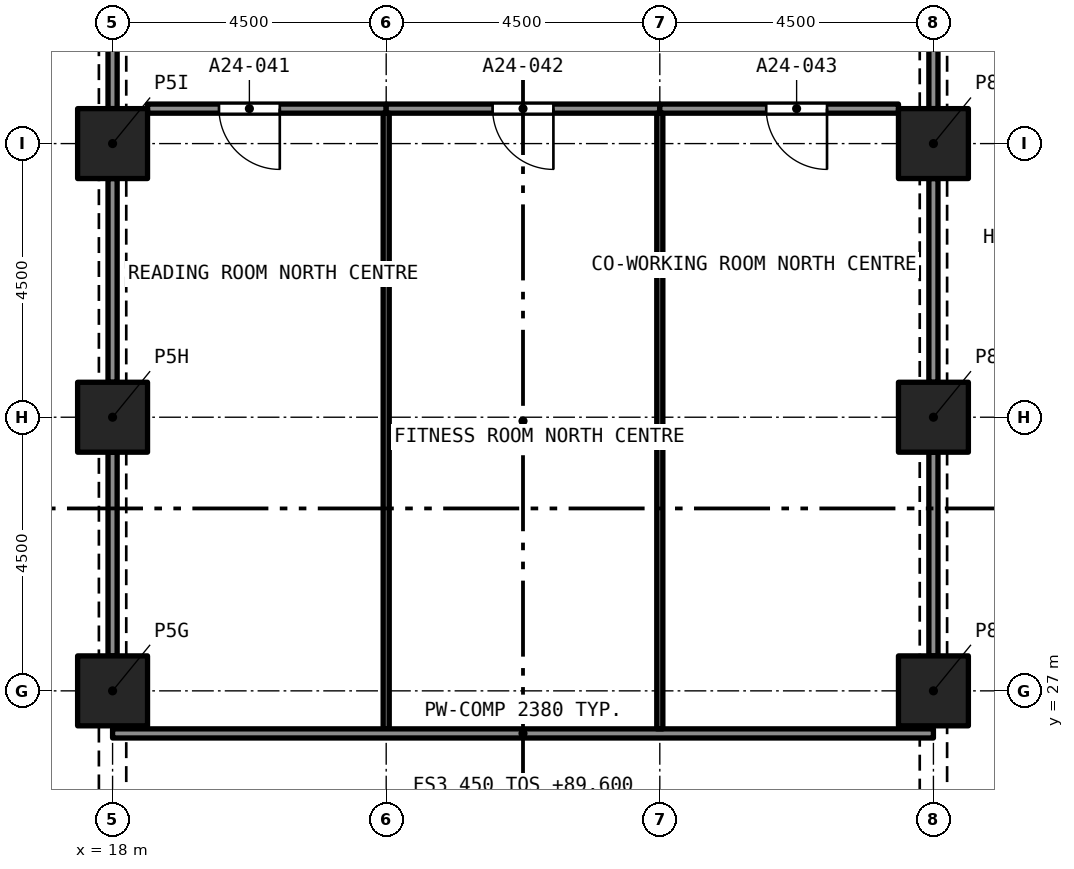
"""IFC4 building model, lengths in metres.
Left out: names, types, materials, properties, quantities, classifications, styles, units other than length and angle.
Written with IfcOpenShell. Run it as: python <this file> out.ifc"""

import sys

from ifc_helpers import new_model, si_unit, direction, frame, frame_2d, origin, origin_2d, place, context, subcontext, project, spatial, rectangle, extrude, element, fill, save


model = new_model("IFC4")
c1 = context("Model", 3, precision=1e-05, world=origin(), true_north=direction((0.0, 1.0)))
c2 = subcontext(c1, "Body", "Model", "MODEL_VIEW")
j1 = project(units=[si_unit("LENGTHUNIT", "METRE"), si_unit("PLANEANGLEUNIT", "RADIAN")], contexts=[c1])
p1 = place(None, origin())
s1 = spatial("IfcSite", under=j1, at=p1, CompositionType="ELEMENT")
p2 = place(p1, origin())
s2 = spatial("IfcBuilding", under=s1, at=p2, CompositionType="ELEMENT")
p3 = place(p2, frame((0.0, 0.0, 89.6)))
s3 = spatial("IfcBuildingStorey", under=s2, at=p3, CompositionType="ELEMENT", Elevation=89.6)
for number, where, z_axis, x_axis in (
    (1, (18.0, 27.0, 0.0), (0.0, 0.0, 1.0), (1.0, 0.0, 0.0)),
    (2, (31.5, 27.0, 0.0), (0.0, 0.0, 1.0), (1.0, 0.0, 0.0)),
    (3, (18.0, 31.5, 0.0), (0.0, 0.0, 1.0), (1.0, 0.0, 0.0)),
    (4, (31.5, 31.5, 0.0), (0.0, 0.0, 1.0), (1.0, 0.0, 0.0)),
    (5, (18.0, 36.0, 0.0), (0.0, 0.0, 1.0), (1.0, 0.0, 0.0)),
    (6, (31.5, 36.0, 0.0), (0.0, 0.0, 1.0), (1.0, 0.0, 0.0)),
):
    element("IfcColumn", number, at=place(p3, frame(where, z_axis=z_axis, x_axis=x_axis)), inside=s3, PredefinedType="COLUMN", context=c2, shape_type="SweptSolid", body=[
        extrude(rectangle(XDim=1.15, YDim=1.15, at=origin_2d()), origin(), (0.0, 0.0, 1.0), 3.2),
    ])
p4 = place(p3, frame((22.5, 36.575, 0.0), z_axis=(0.0, 0.0, 1.0), x_axis=(-1.0, 0.0, 0.0)))
e7 = element("IfcWall", 7, at=p4, inside=s3, PredefinedType="PARTITIONING", context=c2, shape_type="SweptSolid", body=[
    extrude(rectangle(XDim=3.925, YDim=0.15, at=frame_2d((1.962, 0.0))), origin(), (0.0, 0.0, 1.0), 2.75),
])
p5 = place(p4, frame((1.75, 0.0, 0.0)))
e8 = element("IfcOpeningElement", 8, at=p5, cuts=e7, PredefinedType="OPENING", context=c2, shape_type="SweptSolid", body=[
    extrude(rectangle(XDim=1.0, YDim=2.1, at=frame_2d((0.5, 1.05))), frame((0.0, 0.085, 0.0), z_axis=(0.0, -1.0, 0.0), x_axis=(1.0, 0.0, 0.0)), (0.0, 0.0, 1.0), 0.17),
])
p6 = place(p3, frame((27.0, 36.575, 0.0), z_axis=(0.0, 0.0, 1.0), x_axis=(-1.0, 0.0, 0.0)))
e9 = element("IfcWall", 9, at=p6, inside=s3, PredefinedType="PARTITIONING", context=c2, shape_type="SweptSolid", body=[
    extrude(rectangle(XDim=4.5, YDim=0.15, at=frame_2d((2.25, 0.0))), origin(), (0.0, 0.0, 1.0), 2.75),
])
p7 = place(p6, frame((1.75, 0.0, 0.0)))
e10 = element("IfcOpeningElement", 10, at=p7, cuts=e9, PredefinedType="OPENING", context=c2, shape_type="SweptSolid", body=[
    extrude(rectangle(XDim=1.0, YDim=2.1, at=frame_2d((0.5, 1.05))), frame((0.0, 0.085, 0.0), z_axis=(0.0, -1.0, 0.0), x_axis=(1.0, 0.0, 0.0)), (0.0, 0.0, 1.0), 0.17),
])
p8 = place(p3, frame((30.925, 36.575, 0.0), z_axis=(0.0, 0.0, 1.0), x_axis=(-1.0, 0.0, 0.0)))
e11 = element("IfcWall", 11, at=p8, inside=s3, PredefinedType="PARTITIONING", context=c2, shape_type="SweptSolid", body=[
    extrude(rectangle(XDim=3.925, YDim=0.15, at=frame_2d((1.962, 0.0))), origin(), (0.0, 0.0, 1.0), 2.75),
])
p9 = place(p8, frame((1.175, 0.0, 0.0)))
e12 = element("IfcOpeningElement", 12, at=p9, cuts=e11, PredefinedType="OPENING", context=c2, shape_type="SweptSolid", body=[
    extrude(rectangle(XDim=1.0, YDim=2.1, at=frame_2d((0.5, 1.05))), frame((0.0, 0.085, 0.0), z_axis=(0.0, -1.0, 0.0), x_axis=(1.0, 0.0, 0.0)), (0.0, 0.0, 1.0), 0.17),
])
p10 = place(p3, frame((31.5, 36.575, 0.0), z_axis=(0.0, 0.0, 1.0), x_axis=(0.0, 1.0, 0.0)))
e13 = element("IfcWall", 13, at=p10, inside=s3, PredefinedType="PARTITIONING", context=c2, shape_type="SweptSolid", body=[
    extrude(rectangle(XDim=3.35, YDim=0.15, at=frame_2d((1.675, 0.0))), origin(), (0.0, 0.0, 1.0), 2.38),
])
p11 = place(p10, frame((1.075, 0.0, 0.0)))
e14 = element("IfcOpeningElement", 14, at=p11, cuts=e13, PredefinedType="OPENING", context=c2, shape_type="SweptSolid", body=[
    extrude(rectangle(XDim=1.2, YDim=2.1, at=frame_2d((0.6, 1.05))), frame((0.0, 0.085, 0.0), z_axis=(0.0, -1.0, 0.0), x_axis=(1.0, 0.0, 0.0)), (0.0, 0.0, 1.0), 0.17),
])
p12 = place(p3, frame((18.0, 39.925, 0.0), z_axis=(0.0, 0.0, 1.0), x_axis=(0.0, -1.0, 0.0)))
e15 = element("IfcWall", 15, at=p12, inside=s3, PredefinedType="PARTITIONING", context=c2, shape_type="SweptSolid", body=[
    extrude(rectangle(XDim=3.35, YDim=0.15, at=frame_2d((1.675, 0.0))), origin(), (0.0, 0.0, 1.0), 2.38),
])
p13 = place(p12, frame((1.075, 0.0, 0.0)))
e16 = element("IfcOpeningElement", 16, at=p13, cuts=e15, PredefinedType="OPENING", context=c2, shape_type="SweptSolid", body=[
    extrude(rectangle(XDim=1.2, YDim=2.1, at=frame_2d((0.6, 1.05))), frame((0.0, 0.085, 0.0), z_axis=(0.0, -1.0, 0.0), x_axis=(1.0, 0.0, 0.0)), (0.0, 0.0, 1.0), 0.17),
])
p14 = place(p3, frame((22.5, 26.375, 0.0), z_axis=(0.0, 0.0, 1.0), x_axis=(0.0, 1.0, 0.0)))
e17 = element("IfcWall", 17, at=p14, inside=s3, PredefinedType="PARTITIONING", context=c2, shape_type="SweptSolid", body=[
    extrude(rectangle(XDim=10.125, YDim=0.1, at=frame_2d((5.062, 0.0))), origin(), (0.0, 0.0, 1.0), 2.75),
])
for number, where, z_axis, x_axis in (
    (18, (18.0, 27.575, 0.0), (0.0, 0.0, 1.0), (0.0, 1.0, 0.0)),
    (19, (18.0, 32.075, 0.0), (0.0, 0.0, 1.0), (0.0, 1.0, 0.0)),
):
    element("IfcWall", number, at=place(p3, frame(where, z_axis=z_axis, x_axis=x_axis)), inside=s3, PredefinedType="PARTITIONING", context=c2, shape_type="SweptSolid", body=[
        extrude(rectangle(XDim=3.35, YDim=0.15, at=frame_2d((1.675, 0.0))), origin(), (0.0, 0.0, 1.0), 2.38),
    ])
p15 = place(p3, frame((18.0, 26.3, 0.0), z_axis=(0.0, 0.0, 1.0), x_axis=(1.0, 0.0, 0.0)))
e20 = element("IfcWall", 20, at=p15, inside=s3, PredefinedType="PARTITIONING", context=c2, shape_type="SweptSolid", body=[
    extrude(rectangle(XDim=13.5, YDim=0.15, at=frame_2d((6.75, 0.0))), origin(), (0.0, 0.0, 1.0), 2.38),
])
p16 = place(p3, frame((27.0, 26.375, 0.0), z_axis=(0.0, 0.0, 1.0), x_axis=(0.0, 1.0, 0.0)))
e21 = element("IfcWall", 21, at=p16, inside=s3, PredefinedType="PARTITIONING", context=c2, shape_type="SweptSolid", body=[
    extrude(rectangle(XDim=10.125, YDim=0.1, at=frame_2d((5.062, 0.0))), origin(), (0.0, 0.0, 1.0), 2.75),
])
for number, where, z_axis, x_axis in (
    (22, (31.5, 32.075, 0.0), (0.0, 0.0, 1.0), (0.0, 1.0, 0.0)),
    (23, (31.5, 27.575, 0.0), (0.0, 0.0, 1.0), (0.0, 1.0, 0.0)),
):
    element("IfcWall", number, at=place(p3, frame(where, z_axis=z_axis, x_axis=x_axis)), inside=s3, PredefinedType="PARTITIONING", context=c2, shape_type="SweptSolid", body=[
        extrude(rectangle(XDim=3.35, YDim=0.15, at=frame_2d((1.675, 0.0))), origin(), (0.0, 0.0, 1.0), 2.38),
    ])
p17 = place(p5, origin())
e24 = element("IfcDoor", 24, at=p17, inside=s3, OperationType="SINGLE_SWING_RIGHT", PredefinedType="DOOR", context=c2, shape_type="SweptSolid", body=[
    extrude(rectangle(XDim=1.0, YDim=2.1, at=frame_2d((0.5, 1.05))), frame((0.0, 0.025, 0.0), z_axis=(0.0, -1.0, 0.0), x_axis=(1.0, 0.0, 0.0)), (0.0, 0.0, 1.0), 0.05),
])
fill(e8, e24)
p18 = place(p7, origin())
e25 = element("IfcDoor", 25, at=p18, inside=s3, OperationType="SINGLE_SWING_RIGHT", PredefinedType="DOOR", context=c2, shape_type="SweptSolid", body=[
    extrude(rectangle(XDim=1.0, YDim=2.1, at=frame_2d((0.5, 1.05))), frame((0.0, 0.025, 0.0), z_axis=(0.0, -1.0, 0.0), x_axis=(1.0, 0.0, 0.0)), (0.0, 0.0, 1.0), 0.05),
])
fill(e10, e25)
p19 = place(p9, origin())
e26 = element("IfcDoor", 26, at=p19, inside=s3, OperationType="SINGLE_SWING_LEFT", PredefinedType="DOOR", context=c2, shape_type="SweptSolid", body=[
    extrude(rectangle(XDim=1.0, YDim=2.1, at=frame_2d((0.5, 1.05))), frame((0.0, 0.025, 0.0), z_axis=(0.0, -1.0, 0.0), x_axis=(1.0, 0.0, 0.0)), (0.0, 0.0, 1.0), 0.05),
])
fill(e12, e26)
save(model, sys.argv[1])
